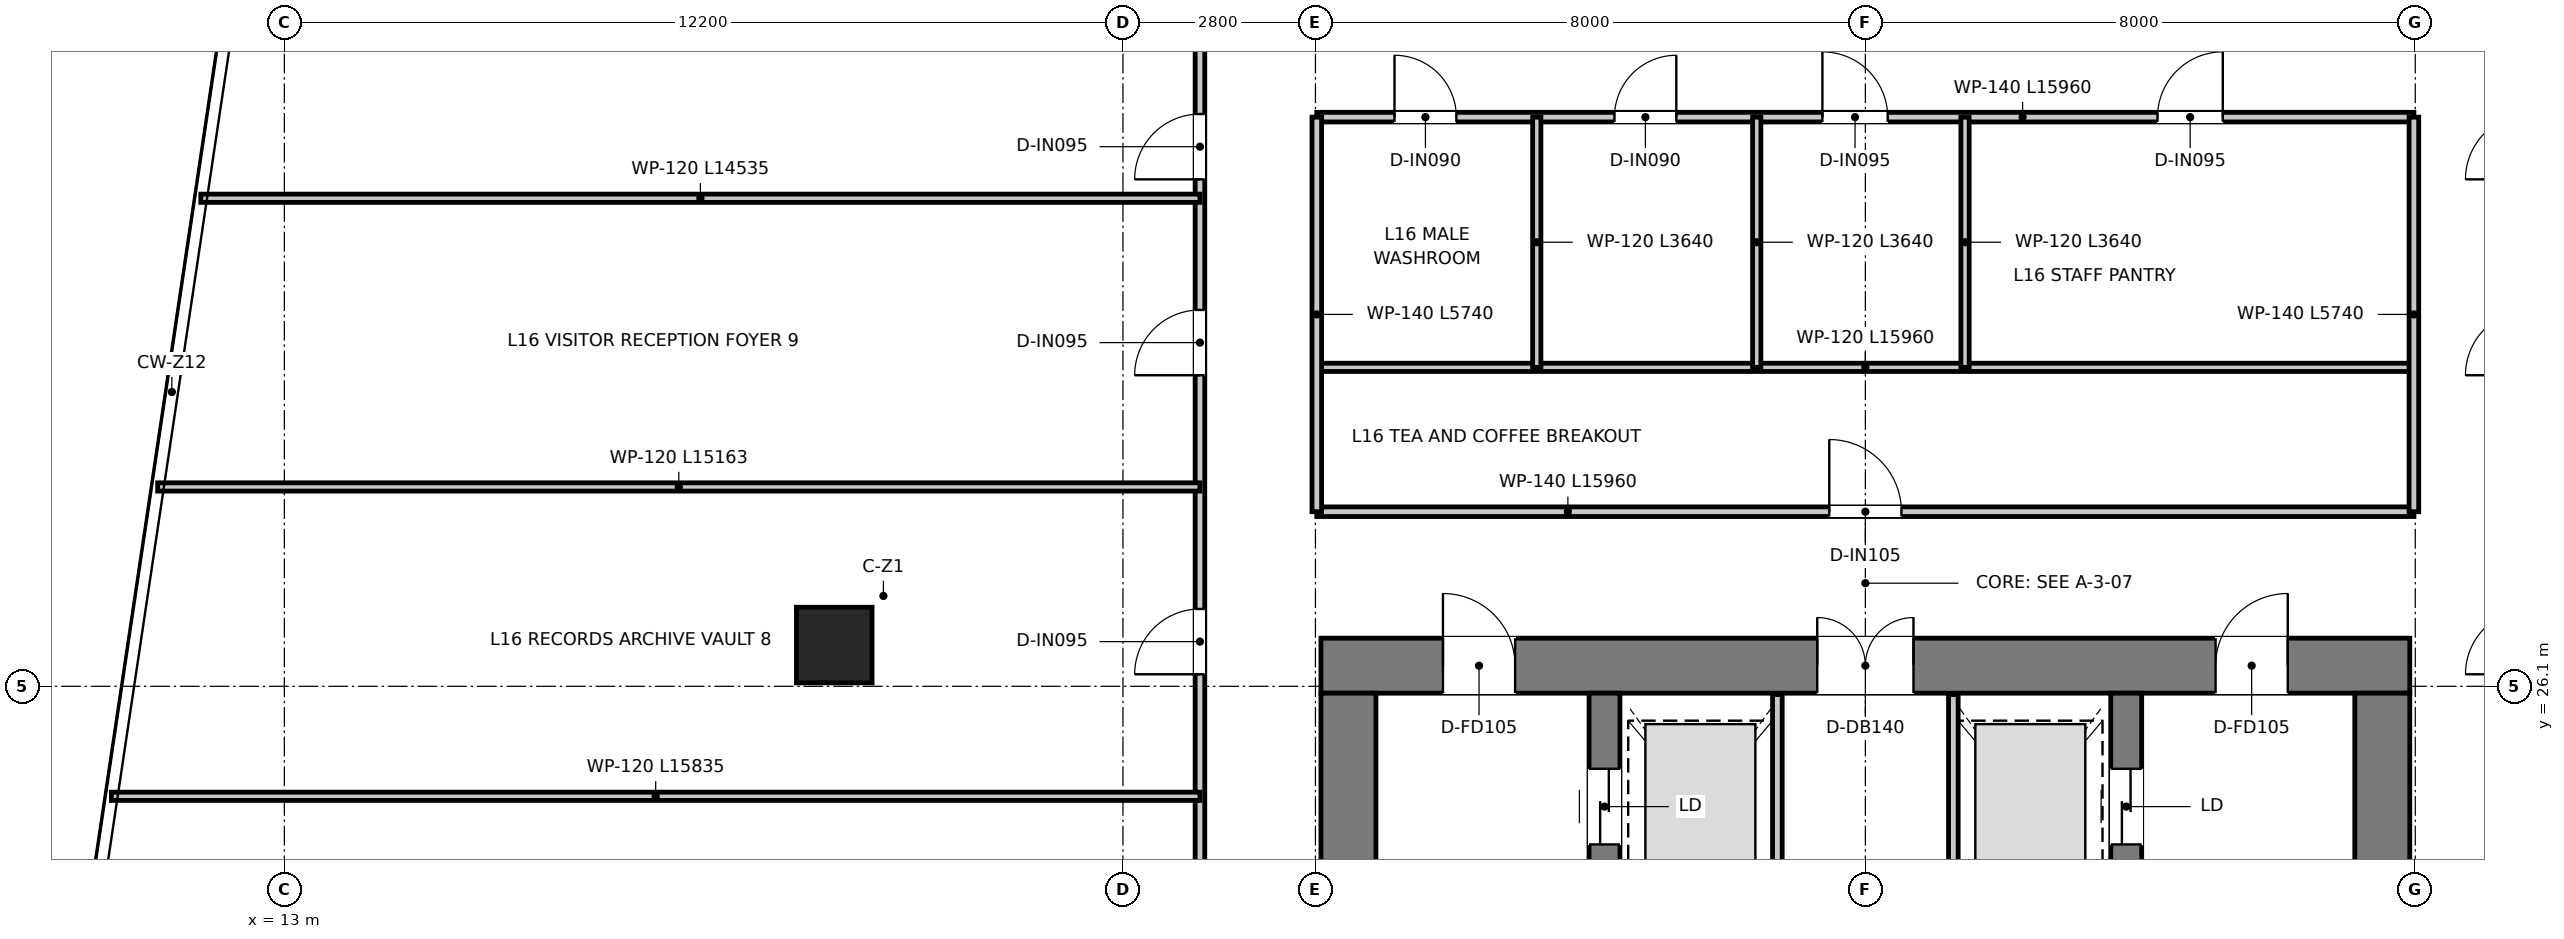
"""IFC4 building model, lengths in metres.
Left out: names, types, materials, properties, quantities, classifications, styles, units other than length and angle.
Written with IfcOpenShell. Run it as: python <this file> out.ifc"""

import sys

from ifc_helpers import new_model, si_unit, direction, frame, frame_2d, origin, origin_2d, place, context, subcontext, project, spatial, rectangle, extrude, source, transform, mapped, element, fill, save


model = new_model("IFC4")
c1 = context("Model", 3, precision=1e-05, world=origin(), true_north=direction((0.0, 1.0)))
c2 = subcontext(c1, "Body", "Model", "MODEL_VIEW")
j1 = project(units=[si_unit("LENGTHUNIT", "METRE"), si_unit("PLANEANGLEUNIT", "RADIAN")], contexts=[c1])
p1 = place(None, origin())
s1 = spatial("IfcSite", under=j1, at=p1, CompositionType="ELEMENT")
p2 = place(p1, origin())
s2 = spatial("IfcBuilding", under=s1, at=p2, CompositionType="ELEMENT")
p3 = place(p2, frame((0.0, 0.0, 68.45)))
s3 = spatial("IfcBuildingStorey", under=s2, at=p3, CompositionType="ELEMENT", Elevation=68.45)
p4 = place(p3, frame((28.08, 26.4, 0.0), z_axis=(0.0, 0.0, 1.0), x_axis=(1.0, 0.0, 0.0)))
e1 = element("IfcWall", 1, at=p4, inside=s3, PredefinedType="SHEAR", context=c2, shape_type="SweptSolid", body=[
    extrude(rectangle(XDim=15.84, YDim=0.8, at=frame_2d((7.92, 0.0))), origin(), (0.0, 0.0, 1.0), 3.95),
])
p5 = place(p4, frame((7.22, 0.0, 0.0)))
e2 = element("IfcOpeningElement", 2, at=p5, cuts=e1, PredefinedType="OPENING", context=c2, shape_type="SweptSolid", body=[
    extrude(rectangle(XDim=1.4, YDim=2.2, at=frame_2d((0.7, 1.1))), frame((0.0, 0.41, 0.0), z_axis=(0.0, -1.0, 0.0), x_axis=(1.0, 0.0, 0.0)), (0.0, 0.0, 1.0), 0.82),
])
p6 = place(p4, frame((1.775, 0.0, 0.0)))
e3 = element("IfcOpeningElement", 3, at=p6, cuts=e1, PredefinedType="OPENING", context=c2, shape_type="SweptSolid", body=[
    extrude(rectangle(XDim=1.05, YDim=2.1, at=frame_2d((0.525, 1.05))), frame((0.0, 0.41, 0.0), z_axis=(0.0, -1.0, 0.0), x_axis=(1.0, 0.0, 0.0)), (0.0, 0.0, 1.0), 0.82),
])
p7 = place(p4, frame((13.015, 0.0, 0.0)))
e4 = element("IfcOpeningElement", 4, at=p7, cuts=e1, PredefinedType="OPENING", context=c2, shape_type="SweptSolid", body=[
    extrude(rectangle(XDim=1.05, YDim=2.1, at=frame_2d((0.525, 1.05))), frame((0.0, 0.41, 0.0), z_axis=(0.0, -1.0, 0.0), x_axis=(1.0, 0.0, 0.0)), (0.0, 0.0, 1.0), 0.82),
])
for number, where, z_axis, x_axis in (
    (5, (28.48, 11.3, 0.0), (0.0, 0.0, 1.0), (0.0, 1.0, 0.0)),
    (6, (43.52, 11.3, 0.0), (0.0, 0.0, 1.0), (0.0, 1.0, 0.0)),
):
    element("IfcWall", number, at=place(p3, frame(where, z_axis=z_axis, x_axis=x_axis)), inside=s3, PredefinedType="SHEAR", context=c2, shape_type="SweptSolid", body=[
        extrude(rectangle(XDim=14.7, YDim=0.8, at=frame_2d((7.35, 0.0))), origin(), (0.0, 0.0, 1.0), 3.95),
    ])
p8 = place(p3, frame((32.205, 13.22, 0.0), z_axis=(0.0, 0.0, 1.0), x_axis=(0.0, 1.0, 0.0)))
e7 = element("IfcWall", 7, at=p8, inside=s3, PredefinedType="SHEAR", context=c2, shape_type="SweptSolid", body=[
    extrude(rectangle(XDim=12.78, YDim=0.45, at=frame_2d((6.39, 0.0))), origin(), (0.0, 0.0, 1.0), 3.95),
])
p9 = place(p8, frame((10.58, 0.0, 0.0)))
e8 = element("IfcOpeningElement", 8, at=p9, cuts=e7, PredefinedType="OPENING", context=c2, shape_type="SweptSolid", body=[
    extrude(rectangle(XDim=1.1, YDim=2.15, at=frame_2d((0.55, 1.075))), frame((0.0, 0.235, 0.0), z_axis=(0.0, -1.0, 0.0), x_axis=(1.0, 0.0, 0.0)), (0.0, 0.0, 1.0), 0.47),
])
p10 = place(p3, frame((39.795, 13.22, 0.0), z_axis=(0.0, 0.0, 1.0), x_axis=(0.0, 1.0, 0.0)))
e9 = element("IfcWall", 9, at=p10, inside=s3, PredefinedType="SHEAR", context=c2, shape_type="SweptSolid", body=[
    extrude(rectangle(XDim=12.78, YDim=0.45, at=frame_2d((6.39, 0.0))), origin(), (0.0, 0.0, 1.0), 3.95),
])
p11 = place(p10, frame((10.58, 0.0, 0.0)))
e10 = element("IfcOpeningElement", 10, at=p11, cuts=e9, PredefinedType="OPENING", context=c2, shape_type="SweptSolid", body=[
    extrude(rectangle(XDim=1.1, YDim=2.15, at=frame_2d((0.55, 1.075))), frame((0.0, 0.235, 0.0), z_axis=(0.0, -1.0, 0.0), x_axis=(1.0, 0.0, 0.0)), (0.0, 0.0, 1.0), 0.47),
])
m1 = source(origin(), c2, "Body", "SweptSolid", [
    extrude(rectangle(XDim=1.1, YDim=1.1, at=origin_2d()), origin(), (0.0, 0.0, 1.0), 3.95),
])
p12 = place(p3, frame((21.0, 26.7, 0.0), z_axis=(0.0, 0.0, 1.0), x_axis=(1.0, 0.0, 0.0)))
e11 = element("IfcColumn", 11, at=p12, inside=s3, PredefinedType="COLUMN", context=c2, shape_type="MappedRepresentation", body=[
    mapped(m1, transform((0.0, 0.0, 0.0), x_axis=(1.0, 0.0, 0.0), y_axis=(0.0, 1.0, 0.0), z_axis=(0.0, 0.0, 1.0), scale=1.0)),
])
p13 = place(p3, frame((34.72, 20.2, 0.0), z_axis=(0.0, 0.0, 1.0), x_axis=(0.0, 1.0, 0.0)))
e12 = element("IfcWall", 12, at=p13, inside=s3, PredefinedType="PARTITIONING", context=c2, shape_type="SweptSolid", body=[
    extrude(rectangle(XDim=5.78, YDim=0.14, at=frame_2d((2.89, 0.0))), origin(), (0.0, 0.0, 1.0), 2.47),
])
p14 = place(p13, frame((1.05, 0.0, 0.0)))
e13 = element("IfcOpeningElement", 13, at=p14, cuts=e12, PredefinedType="OPENING", context=c2, shape_type="SweptSolid", body=[
    extrude(rectangle(XDim=0.9, YDim=2.1, at=frame_2d((0.45, 1.05))), frame((0.0, 0.08, 0.0), z_axis=(0.0, -1.0, 0.0), x_axis=(1.0, 0.0, 0.0)), (0.0, 0.0, 1.0), 0.16),
])
p15 = place(p3, frame((37.28, 20.2, 0.0), z_axis=(0.0, 0.0, 1.0), x_axis=(0.0, 1.0, 0.0)))
e14 = element("IfcWall", 14, at=p15, inside=s3, PredefinedType="PARTITIONING", context=c2, shape_type="SweptSolid", body=[
    extrude(rectangle(XDim=5.78, YDim=0.14, at=frame_2d((2.89, 0.0))), origin(), (0.0, 0.0, 1.0), 2.47),
])
p16 = place(p15, frame((0.95, 0.0, 0.0)))
e15 = element("IfcOpeningElement", 15, at=p16, cuts=e14, PredefinedType="OPENING", context=c2, shape_type="SweptSolid", body=[
    extrude(rectangle(XDim=1.1, YDim=2.15, at=frame_2d((0.55, 1.075))), frame((0.0, 0.08, 0.0), z_axis=(0.0, -1.0, 0.0), x_axis=(1.0, 0.0, 0.0)), (0.0, 0.0, 1.0), 0.16),
])
p17 = place(p3, frame((28.02, 28.64, 0.0), z_axis=(0.0, 0.0, 1.0), x_axis=(1.0, 0.0, 0.0)))
e16 = element("IfcWall", 16, at=p17, inside=s3, PredefinedType="PARTITIONING", context=c2, shape_type="SweptSolid", body=[
    extrude(rectangle(XDim=15.96, YDim=0.14, at=frame_2d((7.98, 0.0))), origin(), (0.0, 0.0, 1.0), 3.08),
])
p18 = place(p17, frame((7.455, 0.0, 0.0)))
e17 = element("IfcOpeningElement", 17, at=p18, cuts=e16, PredefinedType="OPENING", context=c2, shape_type="SweptSolid", body=[
    extrude(rectangle(XDim=1.05, YDim=2.15, at=frame_2d((0.525, 1.075))), frame((0.0, 0.08, 0.0), z_axis=(0.0, -1.0, 0.0), x_axis=(1.0, 0.0, 0.0)), (0.0, 0.0, 1.0), 0.16),
])
p19 = place(p3, frame((28.02, 30.74, 0.0), z_axis=(0.0, 0.0, 1.0), x_axis=(1.0, 0.0, 0.0)))
e18 = element("IfcWall", 18, at=p19, inside=s3, PredefinedType="PARTITIONING", context=c2, shape_type="SweptSolid", body=[
    extrude(rectangle(XDim=15.96, YDim=0.12, at=frame_2d((7.98, 0.0))), origin(), (0.0, 0.0, 1.0), 3.08),
])
p20 = place(p3, frame((28.02, 34.38, 0.0), z_axis=(0.0, 0.0, 1.0), x_axis=(1.0, 0.0, 0.0)))
e19 = element("IfcWall", 19, at=p20, inside=s3, PredefinedType="PARTITIONING", context=c2, shape_type="SweptSolid", body=[
    extrude(rectangle(XDim=15.96, YDim=0.14, at=frame_2d((7.98, 0.0))), origin(), (0.0, 0.0, 1.0), 3.08),
])
p21 = place(p20, frame((1.13, 0.0, 0.0)))
e20 = element("IfcOpeningElement", 20, at=p21, cuts=e19, PredefinedType="OPENING", context=c2, shape_type="SweptSolid", body=[
    extrude(rectangle(XDim=0.9, YDim=2.1, at=frame_2d((0.45, 1.05))), frame((0.0, 0.08, 0.0), z_axis=(0.0, -1.0, 0.0), x_axis=(1.0, 0.0, 0.0)), (0.0, 0.0, 1.0), 0.16),
])
p22 = place(p20, frame((4.33, 0.0, 0.0)))
e21 = element("IfcOpeningElement", 21, at=p22, cuts=e19, PredefinedType="OPENING", context=c2, shape_type="SweptSolid", body=[
    extrude(rectangle(XDim=0.9, YDim=2.1, at=frame_2d((0.45, 1.05))), frame((0.0, 0.08, 0.0), z_axis=(0.0, -1.0, 0.0), x_axis=(1.0, 0.0, 0.0)), (0.0, 0.0, 1.0), 0.16),
])
p23 = place(p20, frame((7.355, 0.0, 0.0)))
e22 = element("IfcOpeningElement", 22, at=p23, cuts=e19, PredefinedType="OPENING", context=c2, shape_type="SweptSolid", body=[
    extrude(rectangle(XDim=0.95, YDim=2.1, at=frame_2d((0.475, 1.05))), frame((0.0, 0.08, 0.0), z_axis=(0.0, -1.0, 0.0), x_axis=(1.0, 0.0, 0.0)), (0.0, 0.0, 1.0), 0.16),
])
p24 = place(p20, frame((12.23, 0.0, 0.0)))
e23 = element("IfcOpeningElement", 23, at=p24, cuts=e19, PredefinedType="OPENING", context=c2, shape_type="SweptSolid", body=[
    extrude(rectangle(XDim=0.95, YDim=2.1, at=frame_2d((0.475, 1.05))), frame((0.0, 0.08, 0.0), z_axis=(0.0, -1.0, 0.0), x_axis=(1.0, 0.0, 0.0)), (0.0, 0.0, 1.0), 0.16),
])
for number, where, z_axis, x_axis in (
    (24, (28.02, 28.64, 0.0), (0.0, 0.0, 1.0), (0.0, 1.0, 0.0)),
    (25, (43.98, 28.64, 0.0), (0.0, 0.0, 1.0), (0.0, 1.0, 0.0)),
):
    element("IfcWall", number, at=place(p3, frame(where, z_axis=z_axis, x_axis=x_axis)), inside=s3, PredefinedType="PARTITIONING", context=c2, shape_type="SweptSolid", body=[
        extrude(rectangle(XDim=5.74, YDim=0.14, at=frame_2d((2.87, 0.0))), origin(), (0.0, 0.0, 1.0), 3.22),
    ])
for number, where, z_axis, x_axis in (
    (26, (31.22, 30.74, 0.0), (0.0, 0.0, 1.0), (0.0, 1.0, 0.0)),
    (27, (34.42, 30.74, 0.0), (0.0, 0.0, 1.0), (0.0, 1.0, 0.0)),
    (28, (37.45, 30.74, 0.0), (0.0, 0.0, 1.0), (0.0, 1.0, 0.0)),
):
    element("IfcWall", number, at=place(p3, frame(where, z_axis=z_axis, x_axis=x_axis)), inside=s3, PredefinedType="PARTITIONING", context=c2, shape_type="SweptSolid", body=[
        extrude(rectangle(XDim=3.64, YDim=0.12, at=frame_2d((1.82, 0.0))), origin(), (0.0, 0.0, 1.0), 3.12),
    ])
p25 = place(p3, frame((26.32, 10.5, 0.0), z_axis=(0.0, 0.0, 1.0), x_axis=(0.0, 1.0, 0.0)))
e29 = element("IfcWall", 29, at=p25, inside=s3, PredefinedType="PARTITIONING", context=c2, shape_type="SweptSolid", body=[
    extrude(rectangle(XDim=25.62, YDim=0.14, at=frame_2d((12.81, 0.0))), origin(), (0.0, 0.0, 1.0), 2.97),
])
p26 = place(p25, frame((7.775, 0.0, 0.0)))
e30 = element("IfcOpeningElement", 30, at=p26, cuts=e29, PredefinedType="OPENING", context=c2, shape_type="SweptSolid", body=[
    extrude(rectangle(XDim=0.95, YDim=2.1, at=frame_2d((0.475, 1.05))), frame((0.0, 0.08, 0.0), z_axis=(0.0, -1.0, 0.0), x_axis=(1.0, 0.0, 0.0)), (0.0, 0.0, 1.0), 0.16),
])
p27 = place(p25, frame((11.275, 0.0, 0.0)))
e31 = element("IfcOpeningElement", 31, at=p27, cuts=e29, PredefinedType="OPENING", context=c2, shape_type="SweptSolid", body=[
    extrude(rectangle(XDim=0.95, YDim=2.1, at=frame_2d((0.475, 1.05))), frame((0.0, 0.08, 0.0), z_axis=(0.0, -1.0, 0.0), x_axis=(1.0, 0.0, 0.0)), (0.0, 0.0, 1.0), 0.16),
])
p28 = place(p25, frame((15.775, 0.0, 0.0)))
e32 = element("IfcOpeningElement", 32, at=p28, cuts=e29, PredefinedType="OPENING", context=c2, shape_type="SweptSolid", body=[
    extrude(rectangle(XDim=0.95, YDim=2.1, at=frame_2d((0.475, 1.05))), frame((0.0, 0.08, 0.0), z_axis=(0.0, -1.0, 0.0), x_axis=(1.0, 0.0, 0.0)), (0.0, 0.0, 1.0), 0.16),
])
p29 = place(p25, frame((20.125, 0.0, 0.0)))
e33 = element("IfcOpeningElement", 33, at=p29, cuts=e29, PredefinedType="OPENING", context=c2, shape_type="SweptSolid", body=[
    extrude(rectangle(XDim=0.95, YDim=2.1, at=frame_2d((0.475, 1.05))), frame((0.0, 0.08, 0.0), z_axis=(0.0, -1.0, 0.0), x_axis=(1.0, 0.0, 0.0)), (0.0, 0.0, 1.0), 0.16),
])
p30 = place(p25, frame((22.975, 0.0, 0.0)))
e34 = element("IfcOpeningElement", 34, at=p30, cuts=e29, PredefinedType="OPENING", context=c2, shape_type="SweptSolid", body=[
    extrude(rectangle(XDim=0.95, YDim=2.1, at=frame_2d((0.475, 1.05))), frame((0.0, 0.08, 0.0), z_axis=(0.0, -1.0, 0.0), x_axis=(1.0, 0.0, 0.0)), (0.0, 0.0, 1.0), 0.16),
])
p31 = place(p3, frame((10.485, 24.5, 0.0), z_axis=(0.0, 0.0, 1.0), x_axis=(1.0, 0.0, 0.0)))
e35 = element("IfcWall", 35, at=p31, inside=s3, PredefinedType="PARTITIONING", context=c2, shape_type="SweptSolid", body=[
    extrude(rectangle(XDim=15.835, YDim=0.12, at=frame_2d((7.918, 0.0))), origin(), (0.0, 0.0, 1.0), 2.97),
])
p32 = place(p3, frame((11.157, 29.0, 0.0), z_axis=(0.0, 0.0, 1.0), x_axis=(1.0, 0.0, 0.0)))
e36 = element("IfcWall", 36, at=p32, inside=s3, PredefinedType="PARTITIONING", context=c2, shape_type="SweptSolid", body=[
    extrude(rectangle(XDim=15.163, YDim=0.12, at=frame_2d((7.582, 0.0))), origin(), (0.0, 0.0, 1.0), 2.97),
])
p33 = place(p3, frame((11.785, 33.2, 0.0), z_axis=(0.0, 0.0, 1.0), x_axis=(1.0, 0.0, 0.0)))
e37 = element("IfcWall", 37, at=p33, inside=s3, PredefinedType="PARTITIONING", context=c2, shape_type="SweptSolid", body=[
    extrude(rectangle(XDim=14.535, YDim=0.12, at=frame_2d((7.268, 0.0))), origin(), (0.0, 0.0, 1.0), 2.97),
])
p34 = place(p5, origin())
e38 = element("IfcDoor", 38, at=p34, inside=s3, OperationType="DOUBLE_DOOR_SINGLE_SWING", PredefinedType="DOOR", context=c2, shape_type="SweptSolid", body=[
    extrude(rectangle(XDim=1.4, YDim=2.2, at=frame_2d((0.7, 1.1))), frame((0.0, 0.025, 0.0), z_axis=(0.0, -1.0, 0.0), x_axis=(1.0, 0.0, 0.0)), (0.0, 0.0, 1.0), 0.05),
])
fill(e2, e38)
p35 = place(p6, origin())
e39 = element("IfcDoor", 39, at=p35, inside=s3, OperationType="SINGLE_SWING_LEFT", PredefinedType="DOOR", context=c2, shape_type="SweptSolid", body=[
    extrude(rectangle(XDim=1.05, YDim=2.1, at=frame_2d((0.525, 1.05))), frame((0.0, 0.025, 0.0), z_axis=(0.0, -1.0, 0.0), x_axis=(1.0, 0.0, 0.0)), (0.0, 0.0, 1.0), 0.05),
])
fill(e3, e39)
p36 = place(p7, origin())
e40 = element("IfcDoor", 40, at=p36, inside=s3, OperationType="SINGLE_SWING_RIGHT", PredefinedType="DOOR", context=c2, shape_type="SweptSolid", body=[
    extrude(rectangle(XDim=1.05, YDim=2.1, at=frame_2d((0.525, 1.05))), frame((0.0, 0.025, 0.0), z_axis=(0.0, -1.0, 0.0), x_axis=(1.0, 0.0, 0.0)), (0.0, 0.0, 1.0), 0.05),
])
fill(e4, e40)
p37 = place(p9, origin())
e41 = element("IfcDoor", 41, at=p37, inside=s3, OperationType="DOUBLE_DOOR_SLIDING", PredefinedType="DOOR", context=c2, shape_type="SweptSolid", body=[
    extrude(rectangle(XDim=1.1, YDim=2.15, at=frame_2d((0.55, 1.075))), frame((0.0, 0.025, 0.0), z_axis=(0.0, -1.0, 0.0), x_axis=(1.0, 0.0, 0.0)), (0.0, 0.0, 1.0), 0.05),
])
fill(e8, e41)
p38 = place(p11, origin())
e42 = element("IfcDoor", 42, at=p38, inside=s3, OperationType="DOUBLE_DOOR_SLIDING", PredefinedType="DOOR", context=c2, shape_type="SweptSolid", body=[
    extrude(rectangle(XDim=1.1, YDim=2.15, at=frame_2d((0.55, 1.075))), frame((0.0, 0.025, 0.0), z_axis=(0.0, -1.0, 0.0), x_axis=(1.0, 0.0, 0.0)), (0.0, 0.0, 1.0), 0.05),
])
fill(e10, e42)
p39 = place(p18, origin())
e43 = element("IfcDoor", 43, at=p39, inside=s3, OperationType="SINGLE_SWING_LEFT", PredefinedType="DOOR", context=c2, shape_type="SweptSolid", body=[
    extrude(rectangle(XDim=1.05, YDim=2.15, at=frame_2d((0.525, 1.075))), frame((0.0, 0.025, 0.0), z_axis=(0.0, -1.0, 0.0), x_axis=(1.0, 0.0, 0.0)), (0.0, 0.0, 1.0), 0.05),
])
fill(e17, e43)
p40 = place(p21, origin())
e44 = element("IfcDoor", 44, at=p40, inside=s3, OperationType="SINGLE_SWING_LEFT", PredefinedType="DOOR", context=c2, shape_type="SweptSolid", body=[
    extrude(rectangle(XDim=0.9, YDim=2.1, at=frame_2d((0.45, 1.05))), frame((0.0, 0.025, 0.0), z_axis=(0.0, -1.0, 0.0), x_axis=(1.0, 0.0, 0.0)), (0.0, 0.0, 1.0), 0.05),
])
fill(e20, e44)
p41 = place(p22, origin())
e45 = element("IfcDoor", 45, at=p41, inside=s3, OperationType="SINGLE_SWING_RIGHT", PredefinedType="DOOR", context=c2, shape_type="SweptSolid", body=[
    extrude(rectangle(XDim=0.9, YDim=2.1, at=frame_2d((0.45, 1.05))), frame((0.0, 0.025, 0.0), z_axis=(0.0, -1.0, 0.0), x_axis=(1.0, 0.0, 0.0)), (0.0, 0.0, 1.0), 0.05),
])
fill(e21, e45)
p42 = place(p23, origin())
e46 = element("IfcDoor", 46, at=p42, inside=s3, OperationType="SINGLE_SWING_LEFT", PredefinedType="DOOR", context=c2, shape_type="SweptSolid", body=[
    extrude(rectangle(XDim=0.95, YDim=2.1, at=frame_2d((0.475, 1.05))), frame((0.0, 0.025, 0.0), z_axis=(0.0, -1.0, 0.0), x_axis=(1.0, 0.0, 0.0)), (0.0, 0.0, 1.0), 0.05),
])
fill(e22, e46)
p43 = place(p24, origin())
e47 = element("IfcDoor", 47, at=p43, inside=s3, OperationType="SINGLE_SWING_RIGHT", PredefinedType="DOOR", context=c2, shape_type="SweptSolid", body=[
    extrude(rectangle(XDim=0.95, YDim=2.1, at=frame_2d((0.475, 1.05))), frame((0.0, 0.025, 0.0), z_axis=(0.0, -1.0, 0.0), x_axis=(1.0, 0.0, 0.0)), (0.0, 0.0, 1.0), 0.05),
])
fill(e23, e47)
p44 = place(p28, origin())
e48 = element("IfcDoor", 48, at=p44, inside=s3, OperationType="SINGLE_SWING_LEFT", PredefinedType="DOOR", context=c2, shape_type="SweptSolid", body=[
    extrude(rectangle(XDim=0.95, YDim=2.1, at=frame_2d((0.475, 1.05))), frame((0.0, 0.025, 0.0), z_axis=(0.0, -1.0, 0.0), x_axis=(1.0, 0.0, 0.0)), (0.0, 0.0, 1.0), 0.05),
])
fill(e32, e48)
p45 = place(p29, origin())
e49 = element("IfcDoor", 49, at=p45, inside=s3, OperationType="SINGLE_SWING_LEFT", PredefinedType="DOOR", context=c2, shape_type="SweptSolid", body=[
    extrude(rectangle(XDim=0.95, YDim=2.1, at=frame_2d((0.475, 1.05))), frame((0.0, 0.025, 0.0), z_axis=(0.0, -1.0, 0.0), x_axis=(1.0, 0.0, 0.0)), (0.0, 0.0, 1.0), 0.05),
])
fill(e33, e49)
p46 = place(p30, origin())
e50 = element("IfcDoor", 50, at=p46, inside=s3, OperationType="SINGLE_SWING_LEFT", PredefinedType="DOOR", context=c2, shape_type="SweptSolid", body=[
    extrude(rectangle(XDim=0.95, YDim=2.1, at=frame_2d((0.475, 1.05))), frame((0.0, 0.025, 0.0), z_axis=(0.0, -1.0, 0.0), x_axis=(1.0, 0.0, 0.0)), (0.0, 0.0, 1.0), 0.05),
])
fill(e34, e50)
save(model, sys.argv[1])
